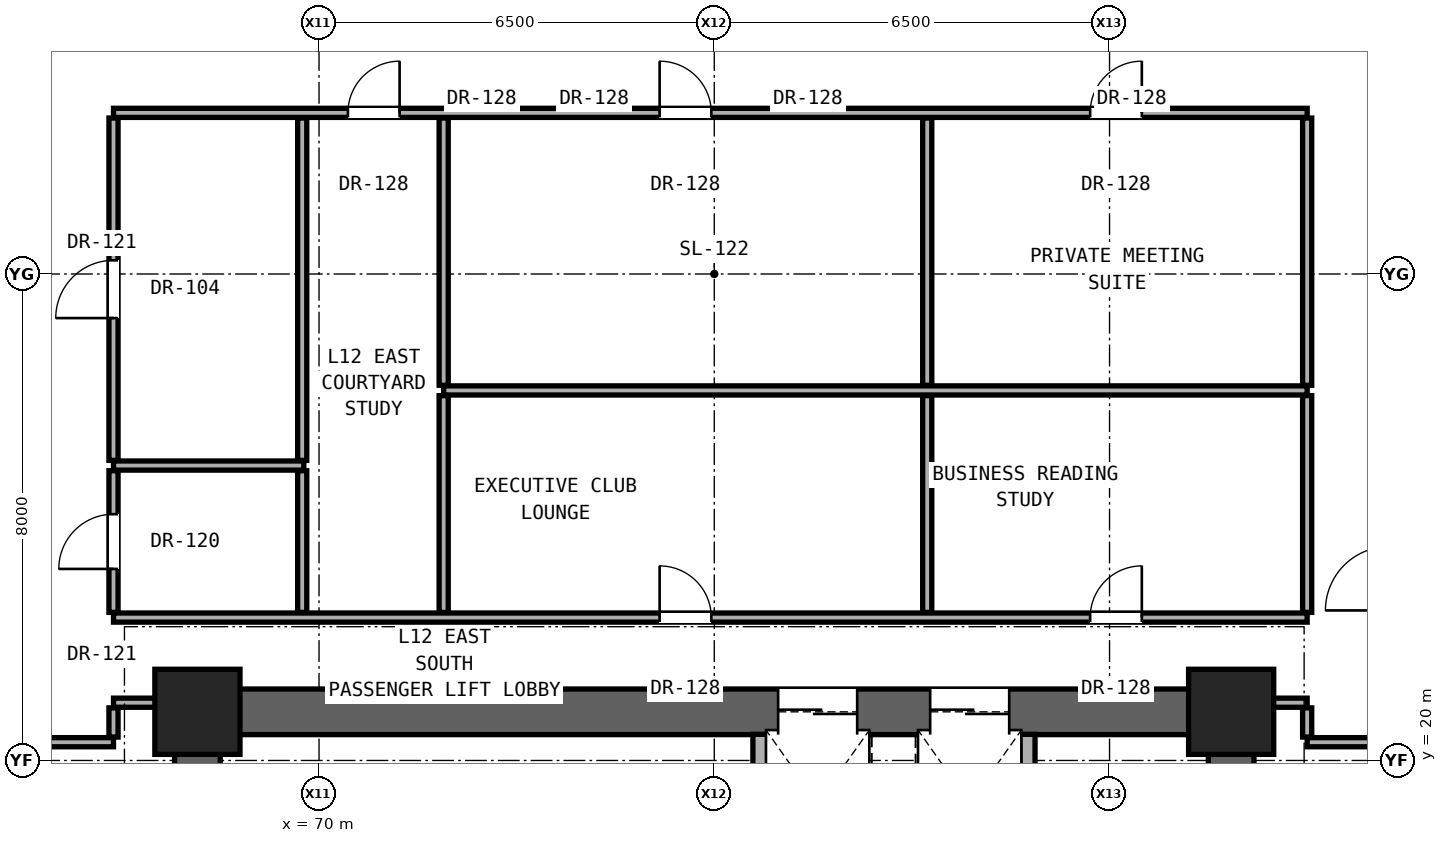
"""IFC4 building model, lengths in metres.
Left out: names, types, materials, properties, quantities, classifications, styles, units other than length and angle.
Written with IfcOpenShell. Run it as: python <this file> out.ifc"""

import sys

from ifc_helpers import new_model, si_unit, direction, frame, frame_2d, origin, origin_2d, place, context, subcontext, project, spatial, rectangle, extrude, element, fill, save


model = new_model("IFC4")
c1 = context("Model", 3, precision=1e-05, world=origin(), true_north=direction((0.0, 1.0)))
c2 = subcontext(c1, "Body", "Model", "MODEL_VIEW")
j1 = project(units=[si_unit("LENGTHUNIT", "METRE"), si_unit("PLANEANGLEUNIT", "RADIAN")], contexts=[c1])
p1 = place(None, origin())
s1 = spatial("IfcSite", under=j1, at=p1, CompositionType="ELEMENT")
p2 = place(p1, origin())
s2 = spatial("IfcBuilding", under=s1, at=p2, CompositionType="ELEMENT")
p3 = place(p2, frame((0.0, 0.0, 45.5)))
s3 = spatial("IfcBuildingStorey", under=s2, at=p3, CompositionType="ELEMENT", Elevation=45.5)
for number, where, z_axis, x_axis in (
    (1, (68.0, 20.8, 0.0), (0.0, 0.0, 1.0), (1.0, 0.0, 0.0)),
    (2, (85.0, 20.8, 0.0), (0.0, 0.0, 1.0), (1.0, 0.0, 0.0)),
):
    element("IfcColumn", number, at=place(p3, frame(where, z_axis=z_axis, x_axis=x_axis)), inside=s3, PredefinedType="COLUMN", context=c2, shape_type="SweptSolid", body=[
        extrude(rectangle(XDim=1.4, YDim=1.4, at=origin_2d()), origin(), (0.0, 0.0, 1.0), 3.3),
    ])
for number, where, z_axis, x_axis in (
    (3, (68.0, 15.2, 0.0), (0.0, 0.0, 1.0), (0.0, 1.0, 0.0)),
    (4, (85.0, 15.2, 0.0), (0.0, 0.0, 1.0), (0.0, 1.0, 0.0)),
):
    element("IfcWall", number, at=place(p3, frame(where, z_axis=z_axis, x_axis=x_axis)), inside=s3, PredefinedType="SHEAR", context=c2, shape_type="SweptSolid", body=[
        extrude(rectangle(XDim=5.6, YDim=0.75, at=frame_2d((2.8, 0.0))), origin(), (0.0, 0.0, 1.0), 3.06),
    ])
p4 = place(p3, frame((68.0, 20.8, 0.0), z_axis=(0.0, 0.0, 1.0), x_axis=(1.0, 0.0, 0.0)))
e5 = element("IfcWall", 5, at=p4, inside=s3, PredefinedType="SHEAR", context=c2, shape_type="SweptSolid", body=[
    extrude(rectangle(XDim=17.0, YDim=0.75, at=frame_2d((8.5, 0.0))), origin(), (0.0, 0.0, 1.0), 3.06),
])
p5 = place(p4, frame((9.55, 0.0, 0.0)))
e6 = element("IfcOpeningElement", 6, at=p5, cuts=e5, PredefinedType="OPENING", context=c2, shape_type="SweptSolid", body=[
    extrude(rectangle(XDim=1.3, YDim=2.3, at=frame_2d((0.65, 1.15))), frame((0.0, 0.385, 0.0), z_axis=(0.0, -1.0, 0.0), x_axis=(1.0, 0.0, 0.0)), (0.0, 0.0, 1.0), 0.77),
])
p6 = place(p4, frame((12.05, 0.0, 0.0)))
e7 = element("IfcOpeningElement", 7, at=p6, cuts=e5, PredefinedType="OPENING", context=c2, shape_type="SweptSolid", body=[
    extrude(rectangle(XDim=1.3, YDim=2.3, at=frame_2d((0.65, 1.15))), frame((0.0, 0.385, 0.0), z_axis=(0.0, -1.0, 0.0), x_axis=(1.0, 0.0, 0.0)), (0.0, 0.0, 1.0), 0.77),
])
p7 = place(p3, frame((65.25, 20.3, 0.0), z_axis=(0.0, 0.0, 1.0), x_axis=(1.0, 0.0, 0.0)))
e8 = element("IfcWall", 8, at=p7, inside=s3, PredefinedType="PARTITIONING", context=c2, shape_type="SweptSolid", body=[
    extrude(rectangle(XDim=1.37, YDim=0.15, at=frame_2d((0.685, 0.0))), origin(), (0.0, 0.0, 1.0), 3.06),
])
p8 = place(p3, frame((86.25, 20.3, 0.0), z_axis=(0.0, 0.0, 1.0), x_axis=(1.0, 0.0, 0.0)))
e9 = element("IfcWall", 9, at=p8, inside=s3, PredefinedType="PARTITIONING", context=c2, shape_type="SweptSolid", body=[
    extrude(rectangle(XDim=1.35, YDim=0.15, at=frame_2d((0.675, 0.0))), origin(), (0.0, 0.0, 1.0), 3.06),
])
p9 = place(p3, frame((66.62, 20.95, 0.0), z_axis=(0.0, 0.0, 1.0), x_axis=(1.0, 0.0, 0.0)))
e10 = element("IfcWall", 10, at=p9, inside=s3, PredefinedType="PARTITIONING", context=c2, shape_type="SweptSolid", body=[
    extrude(rectangle(XDim=1.01, YDim=0.15, at=frame_2d((0.505, 0.0))), origin(), (0.0, 0.0, 1.0), 2.452),
])
p10 = place(p3, frame((85.37, 20.95, 0.0), z_axis=(0.0, 0.0, 1.0), x_axis=(1.0, 0.0, 0.0)))
e11 = element("IfcWall", 11, at=p10, inside=s3, PredefinedType="PARTITIONING", context=c2, shape_type="SweptSolid", body=[
    extrude(rectangle(XDim=0.88, YDim=0.15, at=frame_2d((0.44, 0.0))), origin(), (0.0, 0.0, 1.0), 2.452),
])
p11 = place(p3, frame((66.62, 22.35, 0.0), z_axis=(0.0, 0.0, 1.0), x_axis=(1.0, 0.0, 0.0)))
e12 = element("IfcWall", 12, at=p11, inside=s3, PredefinedType="PARTITIONING", context=c2, shape_type="SweptSolid", body=[
    extrude(rectangle(XDim=19.63, YDim=0.15, at=frame_2d((9.815, 0.0))), origin(), (0.0, 0.0, 1.0), 2.125),
])
p12 = place(p11, frame((8.981, 0.0, 0.0)))
e13 = element("IfcOpeningElement", 13, at=p12, cuts=e12, PredefinedType="OPENING", context=c2, shape_type="SweptSolid", body=[
    extrude(rectangle(XDim=0.85, YDim=2.01, at=frame_2d((0.425, 1.005))), frame((0.0, 0.085, 0.0), z_axis=(0.0, -1.0, 0.0), x_axis=(1.0, 0.0, 0.0)), (0.0, 0.0, 1.0), 0.17),
])
p13 = place(p11, frame((16.061, 0.0, 0.0)))
e14 = element("IfcOpeningElement", 14, at=p13, cuts=e12, PredefinedType="OPENING", context=c2, shape_type="SweptSolid", body=[
    extrude(rectangle(XDim=0.85, YDim=2.01, at=frame_2d((0.425, 1.005))), frame((0.0, 0.085, 0.0), z_axis=(0.0, -1.0, 0.0), x_axis=(1.0, 0.0, 0.0)), (0.0, 0.0, 1.0), 0.17),
])
p14 = place(p3, frame((66.62, 24.85, 0.0), z_axis=(0.0, 0.0, 1.0), x_axis=(1.0, 0.0, 0.0)))
e15 = element("IfcWall", 15, at=p14, inside=s3, PredefinedType="PARTITIONING", context=c2, shape_type="SweptSolid", body=[
    extrude(rectangle(XDim=3.13, YDim=0.15, at=frame_2d((1.565, 0.0))), origin(), (0.0, 0.0, 1.0), 2.125),
])
p15 = place(p3, frame((72.05, 26.085, 0.0), z_axis=(0.0, 0.0, 1.0), x_axis=(1.0, 0.0, 0.0)))
e16 = element("IfcWall", 16, at=p15, inside=s3, PredefinedType="PARTITIONING", context=c2, shape_type="SweptSolid", body=[
    extrude(rectangle(XDim=14.2, YDim=0.15, at=frame_2d((7.1, 0.0))), origin(), (0.0, 0.0, 1.0), 2.125),
])
p16 = place(p3, frame((66.62, 30.65, 0.0), z_axis=(0.0, 0.0, 1.0), x_axis=(1.0, 0.0, 0.0)))
e17 = element("IfcWall", 17, at=p16, inside=s3, PredefinedType="PARTITIONING", context=c2, shape_type="SweptSolid", body=[
    extrude(rectangle(XDim=19.63, YDim=0.15, at=frame_2d((9.815, 0.0))), origin(), (0.0, 0.0, 1.0), 2.125),
])
p17 = place(p16, frame((3.855, 0.0, 0.0)))
e18 = element("IfcOpeningElement", 18, at=p17, cuts=e17, PredefinedType="OPENING", context=c2, shape_type="SweptSolid", body=[
    extrude(rectangle(XDim=0.85, YDim=2.01, at=frame_2d((0.425, 1.005))), frame((0.0, 0.085, 0.0), z_axis=(0.0, -1.0, 0.0), x_axis=(1.0, 0.0, 0.0)), (0.0, 0.0, 1.0), 0.17),
])
p18 = place(p16, frame((8.981, 0.0, 0.0)))
e19 = element("IfcOpeningElement", 19, at=p18, cuts=e17, PredefinedType="OPENING", context=c2, shape_type="SweptSolid", body=[
    extrude(rectangle(XDim=0.85, YDim=2.01, at=frame_2d((0.425, 1.005))), frame((0.0, 0.085, 0.0), z_axis=(0.0, -1.0, 0.0), x_axis=(1.0, 0.0, 0.0)), (0.0, 0.0, 1.0), 0.17),
])
p19 = place(p16, frame((16.061, 0.0, 0.0)))
e20 = element("IfcOpeningElement", 20, at=p19, cuts=e17, PredefinedType="OPENING", context=c2, shape_type="SweptSolid", body=[
    extrude(rectangle(XDim=0.85, YDim=2.01, at=frame_2d((0.425, 1.005))), frame((0.0, 0.085, 0.0), z_axis=(0.0, -1.0, 0.0), x_axis=(1.0, 0.0, 0.0)), (0.0, 0.0, 1.0), 0.17),
])
p20 = place(p3, frame((66.62, 20.385, 0.0), z_axis=(0.0, 0.0, 1.0), x_axis=(0.0, 1.0, 0.0)))
e21 = element("IfcWall", 21, at=p20, inside=s3, PredefinedType="PARTITIONING", context=c2, shape_type="SweptSolid", body=[
    extrude(rectangle(XDim=0.48, YDim=0.15, at=frame_2d((0.24, 0.0))), origin(), (0.0, 0.0, 1.0), 2.452),
])
p21 = place(p3, frame((66.62, 22.435, 0.0), z_axis=(0.0, 0.0, 1.0), x_axis=(0.0, 1.0, 0.0)))
e22 = element("IfcWall", 22, at=p21, inside=s3, PredefinedType="PARTITIONING", context=c2, shape_type="SweptSolid", body=[
    extrude(rectangle(XDim=2.33, YDim=0.15, at=frame_2d((1.165, 0.0))), origin(), (0.0, 0.0, 1.0), 3.06),
])
p22 = place(p21, frame((0.715, 0.0, 0.0)))
e23 = element("IfcOpeningElement", 23, at=p22, cuts=e22, PredefinedType="OPENING", context=c2, shape_type="SweptSolid", body=[
    extrude(rectangle(XDim=0.9, YDim=2.1, at=frame_2d((0.45, 1.05))), frame((0.0, 0.085, 0.0), z_axis=(0.0, -1.0, 0.0), x_axis=(1.0, 0.0, 0.0)), (0.0, 0.0, 1.0), 0.17),
])
p23 = place(p3, frame((66.62, 24.935, 0.0), z_axis=(0.0, 0.0, 1.0), x_axis=(0.0, 1.0, 0.0)))
e24 = element("IfcWall", 24, at=p23, inside=s3, PredefinedType="PARTITIONING", context=c2, shape_type="SweptSolid", body=[
    extrude(rectangle(XDim=5.63, YDim=0.15, at=frame_2d((2.815, 0.0))), origin(), (0.0, 0.0, 1.0), 2.279),
])
p24 = place(p23, frame((2.34, 0.0, 0.0)))
e25 = element("IfcOpeningElement", 25, at=p24, cuts=e24, PredefinedType="OPENING", context=c2, shape_type="SweptSolid", body=[
    extrude(rectangle(XDim=0.95, YDim=2.15, at=frame_2d((0.475, 1.075))), frame((0.0, 0.085, 0.0), z_axis=(0.0, -1.0, 0.0), x_axis=(1.0, 0.0, 0.0)), (0.0, 0.0, 1.0), 0.17),
])
p25 = place(p3, frame((69.723, 22.435, 0.0), z_axis=(0.0, 0.0, 1.0), x_axis=(0.0, 1.0, 0.0)))
e26 = element("IfcWall", 26, at=p25, inside=s3, PredefinedType="PARTITIONING", context=c2, shape_type="SweptSolid", body=[
    extrude(rectangle(XDim=2.33, YDim=0.15, at=frame_2d((1.165, 0.0))), origin(), (0.0, 0.0, 1.0), 3.06),
])
p26 = place(p3, frame((69.723, 24.935, 0.0), z_axis=(0.0, 0.0, 1.0), x_axis=(0.0, 1.0, 0.0)))
e27 = element("IfcWall", 27, at=p26, inside=s3, PredefinedType="PARTITIONING", context=c2, shape_type="SweptSolid", body=[
    extrude(rectangle(XDim=5.63, YDim=0.15, at=frame_2d((2.815, 0.0))), origin(), (0.0, 0.0, 1.0), 2.125),
])
p27 = place(p3, frame((72.05, 22.435, 0.0), z_axis=(0.0, 0.0, 1.0), x_axis=(0.0, 1.0, 0.0)))
e28 = element("IfcWall", 28, at=p27, inside=s3, PredefinedType="PARTITIONING", context=c2, shape_type="SweptSolid", body=[
    extrude(rectangle(XDim=3.565, YDim=0.15, at=frame_2d((1.782, 0.0))), origin(), (0.0, 0.0, 1.0), 2.589),
])
p28 = place(p3, frame((72.05, 26.17, 0.0), z_axis=(0.0, 0.0, 1.0), x_axis=(0.0, 1.0, 0.0)))
e29 = element("IfcWall", 29, at=p28, inside=s3, PredefinedType="PARTITIONING", context=c2, shape_type="SweptSolid", body=[
    extrude(rectangle(XDim=4.395, YDim=0.15, at=frame_2d((2.198, 0.0))), origin(), (0.0, 0.0, 1.0), 2.125),
])
p29 = place(p3, frame((77.26, 18.735, 0.0), z_axis=(0.0, 0.0, 1.0), x_axis=(0.0, 1.0, 0.0)))
e30 = element("IfcWall", 30, at=p29, inside=s3, PredefinedType="SOLIDWALL", context=c2, shape_type="SweptSolid", body=[
    extrude(rectangle(XDim=1.695, YDim=0.25, at=frame_2d((0.847, 0.0))), origin(), (0.0, 0.0, 1.0), 3.06),
])
p30 = place(p3, frame((80.002, 22.435, 0.0), z_axis=(0.0, 0.0, 1.0), x_axis=(0.0, 1.0, 0.0)))
e31 = element("IfcWall", 31, at=p30, inside=s3, PredefinedType="PARTITIONING", context=c2, shape_type="SweptSolid", body=[
    extrude(rectangle(XDim=3.565, YDim=0.15, at=frame_2d((1.782, 0.0))), origin(), (0.0, 0.0, 1.0), 3.06),
])
p31 = place(p3, frame((80.002, 26.17, 0.0), z_axis=(0.0, 0.0, 1.0), x_axis=(0.0, 1.0, 0.0)))
e32 = element("IfcWall", 32, at=p31, inside=s3, PredefinedType="PARTITIONING", context=c2, shape_type="SweptSolid", body=[
    extrude(rectangle(XDim=4.395, YDim=0.15, at=frame_2d((2.198, 0.0))), origin(), (0.0, 0.0, 1.0), 2.125),
])
p32 = place(p3, frame((81.65, 18.185, 0.0), z_axis=(0.0, 0.0, 1.0), x_axis=(0.0, 1.0, 0.0)))
e33 = element("IfcWall", 33, at=p32, inside=s3, PredefinedType="SOLIDWALL", context=c2, shape_type="SweptSolid", body=[
    extrude(rectangle(XDim=2.245, YDim=0.25, at=frame_2d((1.123, 0.0))), origin(), (0.0, 0.0, 1.0), 3.06),
])
p33 = place(p3, frame((86.25, 20.385, 0.0), z_axis=(0.0, 0.0, 1.0), x_axis=(0.0, 1.0, 0.0)))
e34 = element("IfcWall", 34, at=p33, inside=s3, PredefinedType="PARTITIONING", context=c2, shape_type="SweptSolid", body=[
    extrude(rectangle(XDim=0.48, YDim=0.15, at=frame_2d((0.24, 0.0))), origin(), (0.0, 0.0, 1.0), 2.452),
])
p34 = place(p3, frame((86.25, 22.435, 0.0), z_axis=(0.0, 0.0, 1.0), x_axis=(0.0, 1.0, 0.0)))
e35 = element("IfcWall", 35, at=p34, inside=s3, PredefinedType="PARTITIONING", context=c2, shape_type="SweptSolid", body=[
    extrude(rectangle(XDim=3.565, YDim=0.15, at=frame_2d((1.782, 0.0))), origin(), (0.0, 0.0, 1.0), 3.06),
])
p35 = place(p3, frame((86.25, 26.17, 0.0), z_axis=(0.0, 0.0, 1.0), x_axis=(0.0, 1.0, 0.0)))
e36 = element("IfcWall", 36, at=p35, inside=s3, PredefinedType="PARTITIONING", context=c2, shape_type="SweptSolid", body=[
    extrude(rectangle(XDim=4.395, YDim=0.15, at=frame_2d((2.198, 0.0))), origin(), (0.0, 0.0, 1.0), 2.279),
])
p36 = place(p22, origin())
e37 = element("IfcDoor", 37, at=p36, inside=s3, OperationType="SINGLE_SWING_LEFT", PredefinedType="DOOR", context=c2, shape_type="SweptSolid", body=[
    extrude(rectangle(XDim=0.9, YDim=2.1, at=frame_2d((0.45, 1.05))), frame((0.0, 0.025, 0.0), z_axis=(0.0, -1.0, 0.0), x_axis=(1.0, 0.0, 0.0)), (0.0, 0.0, 1.0), 0.05),
])
fill(e23, e37)
p37 = place(p24, origin())
e38 = element("IfcDoor", 38, at=p37, inside=s3, OperationType="SINGLE_SWING_LEFT", PredefinedType="DOOR", context=c2, shape_type="SweptSolid", body=[
    extrude(rectangle(XDim=0.95, YDim=2.15, at=frame_2d((0.475, 1.075))), frame((0.0, 0.025, 0.0), z_axis=(0.0, -1.0, 0.0), x_axis=(1.0, 0.0, 0.0)), (0.0, 0.0, 1.0), 0.05),
])
fill(e25, e38)
p38 = place(p17, origin())
e39 = element("IfcDoor", 39, at=p38, inside=s3, OperationType="SINGLE_SWING_RIGHT", PredefinedType="DOOR", context=c2, shape_type="SweptSolid", body=[
    extrude(rectangle(XDim=0.85, YDim=2.01, at=frame_2d((0.425, 1.005))), frame((0.0, 0.025, 0.0), z_axis=(0.0, -1.0, 0.0), x_axis=(1.0, 0.0, 0.0)), (0.0, 0.0, 1.0), 0.05),
])
fill(e18, e39)
p39 = place(p12, origin())
e40 = element("IfcDoor", 40, at=p39, inside=s3, OperationType="SINGLE_SWING_LEFT", PredefinedType="DOOR", context=c2, shape_type="SweptSolid", body=[
    extrude(rectangle(XDim=0.85, YDim=2.01, at=frame_2d((0.425, 1.005))), frame((0.0, 0.025, 0.0), z_axis=(0.0, -1.0, 0.0), x_axis=(1.0, 0.0, 0.0)), (0.0, 0.0, 1.0), 0.05),
])
fill(e13, e40)
p40 = place(p13, origin())
e41 = element("IfcDoor", 41, at=p40, inside=s3, OperationType="SINGLE_SWING_RIGHT", PredefinedType="DOOR", context=c2, shape_type="SweptSolid", body=[
    extrude(rectangle(XDim=0.85, YDim=2.01, at=frame_2d((0.425, 1.005))), frame((0.0, 0.025, 0.0), z_axis=(0.0, -1.0, 0.0), x_axis=(1.0, 0.0, 0.0)), (0.0, 0.0, 1.0), 0.05),
])
fill(e14, e41)
p41 = place(p18, origin())
e42 = element("IfcDoor", 42, at=p41, inside=s3, OperationType="SINGLE_SWING_LEFT", PredefinedType="DOOR", context=c2, shape_type="SweptSolid", body=[
    extrude(rectangle(XDim=0.85, YDim=2.01, at=frame_2d((0.425, 1.005))), frame((0.0, 0.025, 0.0), z_axis=(0.0, -1.0, 0.0), x_axis=(1.0, 0.0, 0.0)), (0.0, 0.0, 1.0), 0.05),
])
fill(e19, e42)
p42 = place(p19, origin())
e43 = element("IfcDoor", 43, at=p42, inside=s3, OperationType="SINGLE_SWING_RIGHT", PredefinedType="DOOR", context=c2, shape_type="SweptSolid", body=[
    extrude(rectangle(XDim=0.85, YDim=2.01, at=frame_2d((0.425, 1.005))), frame((0.0, 0.025, 0.0), z_axis=(0.0, -1.0, 0.0), x_axis=(1.0, 0.0, 0.0)), (0.0, 0.0, 1.0), 0.05),
])
fill(e20, e43)
p43 = place(p5, origin())
e44 = element("IfcDoor", 44, at=p43, inside=s3, OperationType="DOUBLE_DOOR_SLIDING", PredefinedType="DOOR", context=c2, shape_type="SweptSolid", body=[
    extrude(rectangle(XDim=1.3, YDim=2.3, at=frame_2d((0.65, 1.15))), frame((0.0, 0.025, 0.0), z_axis=(0.0, -1.0, 0.0), x_axis=(1.0, 0.0, 0.0)), (0.0, 0.0, 1.0), 0.05),
])
fill(e6, e44)
p44 = place(p6, origin())
e45 = element("IfcDoor", 45, at=p44, inside=s3, OperationType="DOUBLE_DOOR_SLIDING", PredefinedType="DOOR", context=c2, shape_type="SweptSolid", body=[
    extrude(rectangle(XDim=1.3, YDim=2.3, at=frame_2d((0.65, 1.15))), frame((0.0, 0.025, 0.0), z_axis=(0.0, -1.0, 0.0), x_axis=(1.0, 0.0, 0.0)), (0.0, 0.0, 1.0), 0.05),
])
fill(e7, e45)
save(model, sys.argv[1])
